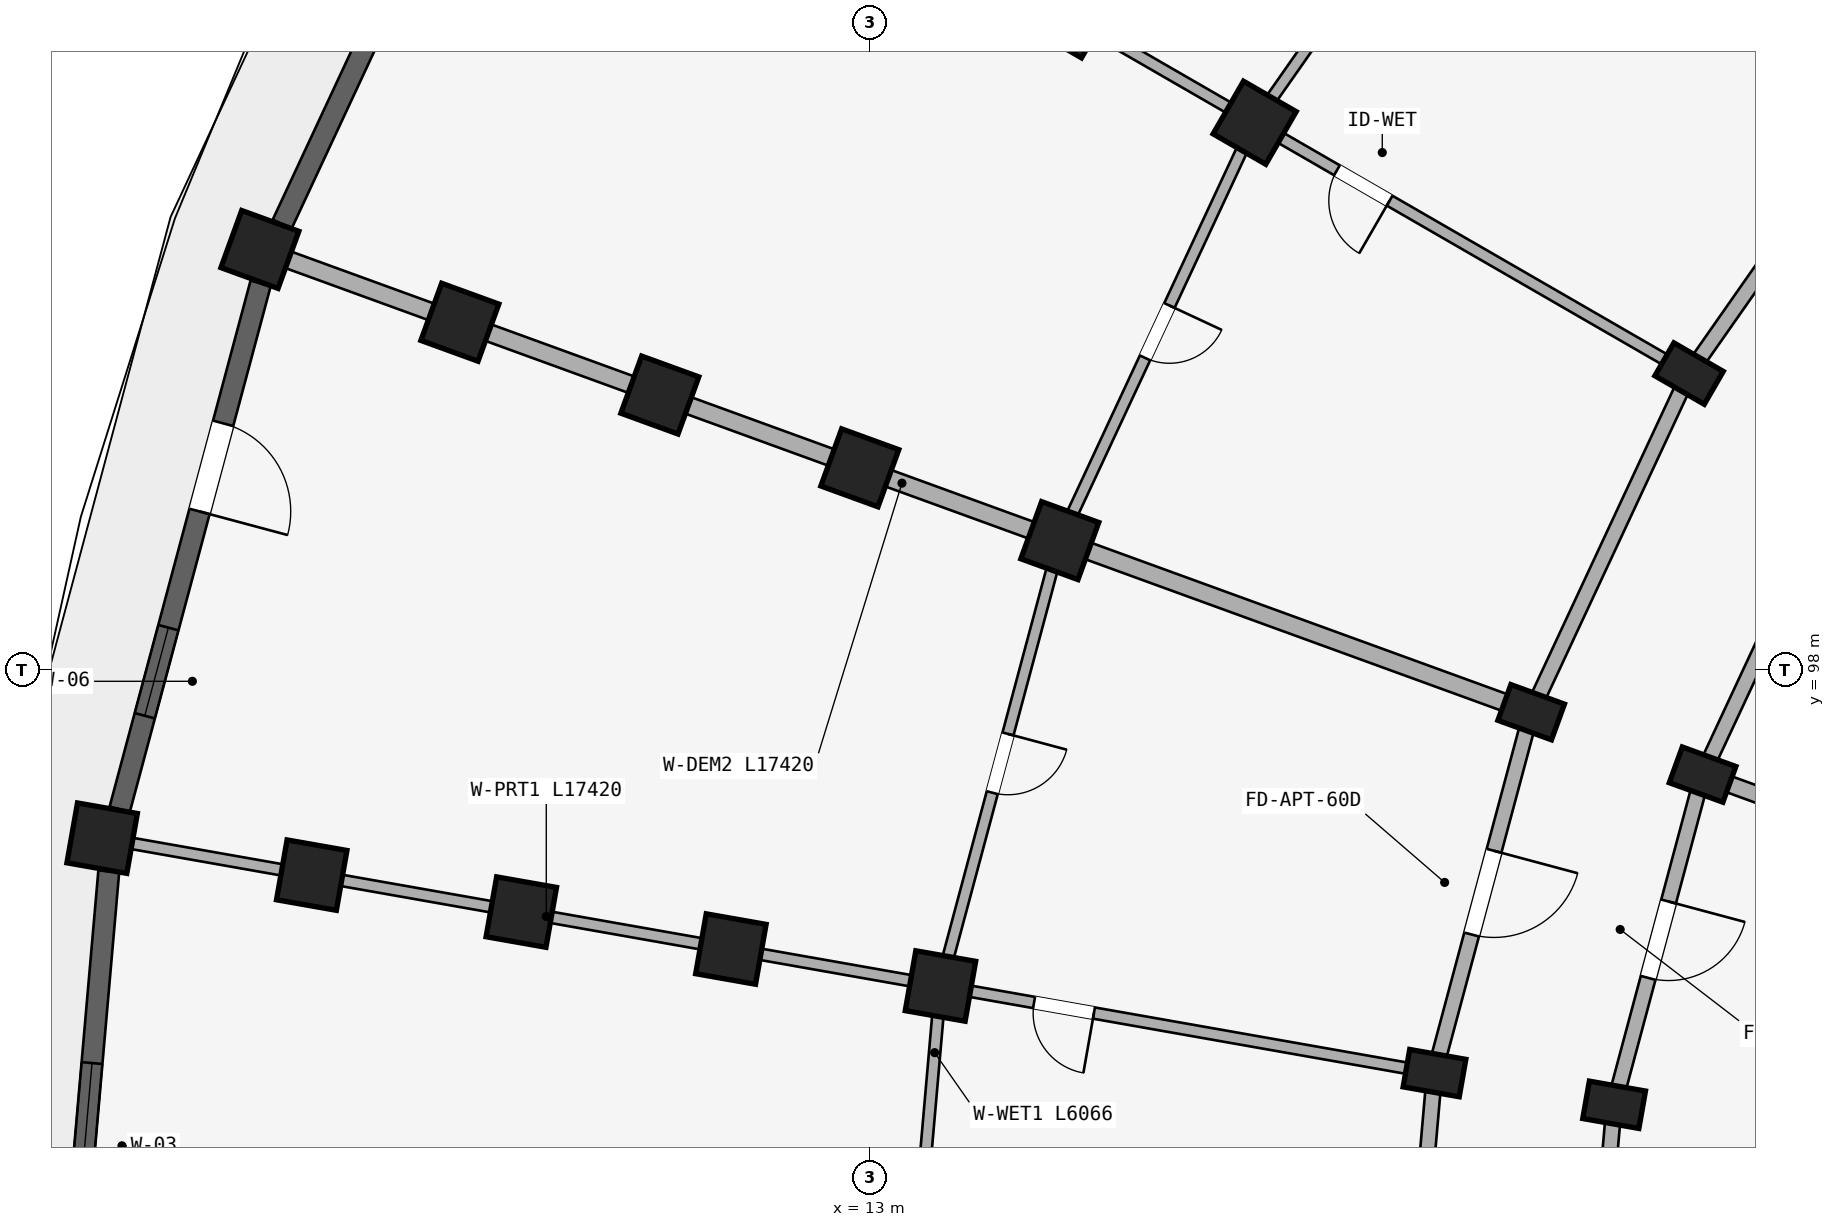
"""IFC4 building model, lengths in metres.
Left out: names, types, materials, properties, quantities, classifications, styles, units other than length and angle.
Written with IfcOpenShell. Run it as: python <this file> out.ifc"""

import sys

from ifc_helpers import new_model, si_unit, direction, frame, frame_2d, origin, origin_2d, place, context, subcontext, project, spatial, rectangle, extrude, element, fill, save


model = new_model("IFC4")
c1 = context("Model", 3, precision=1e-05, world=origin(), true_north=direction((0.0, 1.0)))
c2 = subcontext(c1, "Body", "Model", "MODEL_VIEW")
j1 = project(units=[si_unit("LENGTHUNIT", "METRE"), si_unit("PLANEANGLEUNIT", "RADIAN")], contexts=[c1])
p1 = place(None, origin())
s1 = spatial("IfcSite", under=j1, at=p1, CompositionType="ELEMENT")
p2 = place(p1, origin())
s2 = spatial("IfcBuilding", under=s1, at=p2, CompositionType="ELEMENT")
p3 = place(p2, frame((0.0, 0.0, 8.7)))
s3 = spatial("IfcBuildingStorey", under=s2, at=p3, CompositionType="ELEMENT", Elevation=8.7)
p4 = place(p3, frame((23.778, 101.9, 0.0), z_axis=(0.0, 0.0, 1.0), x_axis=(0.5, 0.866025403784, 0.0)))
e1 = element("IfcColumn", 1, at=p4, inside=s3, PredefinedType="COLUMN", context=c2, shape_type="SweptSolid", body=[
    extrude(rectangle(XDim=0.5, YDim=0.75, at=origin_2d()), origin(), (0.0, 0.0, 1.0), 2.93),
])
for number, where, z_axis, x_axis in (
    (2, (18.062, 105.2, 0.0), (0.0, 0.0, 1.0), (0.5, 0.866, 0.0)),
    (3, (15.637, 106.6, 0.0), (0.0, 0.0, 1.0), (0.5, 0.866, 0.0)),
):
    element("IfcColumn", number, at=place(p3, frame(where, z_axis=z_axis, x_axis=x_axis)), inside=s3, PredefinedType="COLUMN", context=c2, shape_type="SweptSolid", body=[
        extrude(rectangle(XDim=0.8, YDim=0.8, at=origin_2d()), origin(), (0.0, 0.0, 1.0), 2.93),
    ])
for number, where, z_axis, x_axis in (
    (4, (23.956, 96.624, 0.0), (0.0, 0.0, 1.0), (0.342, 0.94, 0.0)),
    (5, (21.701, 97.445, 0.0), (0.0, 0.0, 1.0), (0.342, 0.94, 0.0)),
):
    element("IfcColumn", number, at=place(p3, frame(where, z_axis=z_axis, x_axis=x_axis)), inside=s3, PredefinedType="COLUMN", context=c2, shape_type="SweptSolid", body=[
        extrude(rectangle(XDim=0.5, YDim=0.75, at=origin_2d()), origin(), (0.0, 0.0, 1.0), 2.93),
    ])
for number, where, z_axis, x_axis in (
    (6, (15.499, 99.702, 0.0), (0.0, 0.0, 1.0), (0.342, 0.94, 0.0)),
    (7, (12.868, 100.66, 0.0), (0.0, 0.0, 1.0), (0.342, 0.94, 0.0)),
    (8, (10.236, 101.618, 0.0), (0.0, 0.0, 1.0), (0.342, 0.94, 0.0)),
    (9, (7.605, 102.575, 0.0), (0.0, 0.0, 1.0), (0.342, 0.94, 0.0)),
    (10, (4.974, 103.533, 0.0), (0.0, 0.0, 1.0), (0.342, 0.94, 0.0)),
):
    element("IfcColumn", number, at=place(p3, frame(where, z_axis=z_axis, x_axis=x_axis)), inside=s3, PredefinedType="COLUMN", context=c2, shape_type="SweptSolid", body=[
        extrude(rectangle(XDim=0.8, YDim=0.8, at=origin_2d()), origin(), (0.0, 0.0, 1.0), 2.93),
    ])
for number, where, z_axis, x_axis in (
    (11, (22.792, 92.28, 0.0), (0.0, 0.0, 1.0), (0.174, 0.985, 0.0)),
    (12, (20.428, 92.697, 0.0), (0.0, 0.0, 1.0), (0.174, 0.985, 0.0)),
):
    element("IfcColumn", number, at=place(p3, frame(where, z_axis=z_axis, x_axis=x_axis)), inside=s3, PredefinedType="COLUMN", context=c2, shape_type="SweptSolid", body=[
        extrude(rectangle(XDim=0.5, YDim=0.75, at=origin_2d()), origin(), (0.0, 0.0, 1.0), 2.93),
    ])
for number, where, z_axis, x_axis in (
    (13, (13.929, 93.843, 0.0), (0.0, 0.0, 1.0), (0.174, 0.985, 0.0)),
    (14, (11.171, 94.329, 0.0), (0.0, 0.0, 1.0), (0.174, 0.985, 0.0)),
    (15, (8.414, 94.815, 0.0), (0.0, 0.0, 1.0), (0.174, 0.985, 0.0)),
    (16, (5.656, 95.302, 0.0), (0.0, 0.0, 1.0), (0.174, 0.985, 0.0)),
    (17, (2.899, 95.788, 0.0), (0.0, 0.0, 1.0), (0.174, 0.985, 0.0)),
):
    element("IfcColumn", number, at=place(p3, frame(where, z_axis=z_axis, x_axis=x_axis)), inside=s3, PredefinedType="COLUMN", context=c2, shape_type="SweptSolid", body=[
        extrude(rectangle(XDim=0.8, YDim=0.8, at=origin_2d()), origin(), (0.0, 0.0, 1.0), 2.93),
    ])
p5 = place(p3, frame((26.598, 105.927, 0.0), z_axis=(0.0, 0.0, 1.0), x_axis=(-0.573592335331, -0.819140911474, 0.0)))
e18 = element("IfcWall", 18, at=p5, inside=s3, PredefinedType="STANDARD", context=c2, shape_type="SweptSolid", body=[
    extrude(rectangle(XDim=4.916, YDim=0.2, at=frame_2d((2.458, 0.0))), origin(), (0.0, 0.0, 1.0), 2.372),
])
p6 = place(p5, frame((1.918, 0.0, 0.0)))
e19 = element("IfcOpeningElement", 19, at=p6, cuts=e18, PredefinedType="OPENING", context=c2, shape_type="SweptSolid", body=[
    extrude(rectangle(XDim=1.08, YDim=2.15, at=frame_2d((0.54, 1.075))), frame((0.0, 0.11, 0.0), z_axis=(0.0, -1.0, 0.0), x_axis=(1.0, 0.0, 0.0)), (0.0, 0.0, 1.0), 0.22),
])
p7 = place(p3, frame((25.856, 100.7, 0.0), z_axis=(0.0, 0.0, 1.0), x_axis=(-0.422617978463, -0.906307919131, 0.0)))
e20 = element("IfcWall", 20, at=p7, inside=s3, PredefinedType="STANDARD", context=c2, shape_type="SweptSolid", body=[
    extrude(rectangle(XDim=4.497, YDim=0.2, at=frame_2d((2.249, 0.0))), origin(), (0.0, 0.0, 1.0), 2.372),
])
p8 = place(p3, frame((23.778, 101.9, 0.0), z_axis=(0.0, 0.0, 1.0), x_axis=(-0.422629854778, -0.906302381024, 0.0)))
e21 = element("IfcWall", 21, at=p8, inside=s3, PredefinedType="STANDARD", context=c2, shape_type="SweptSolid", body=[
    extrude(rectangle(XDim=4.915, YDim=0.2, at=frame_2d((2.458, 0.0))), origin(), (0.0, 0.0, 1.0), 2.372),
])
p9 = place(p3, frame((23.956, 96.624, 0.0), z_axis=(0.0, 0.0, 1.0), x_axis=(-0.258787642463, -0.965934240054, 0.0)))
e22 = element("IfcWall", 22, at=p9, inside=s3, PredefinedType="STANDARD", context=c2, shape_type="SweptSolid", body=[
    extrude(rectangle(XDim=4.497, YDim=0.2, at=frame_2d((2.249, 0.0))), origin(), (0.0, 0.0, 1.0), 2.372),
])
p10 = place(p9, frame((1.729, 0.0, 0.0)))
e23 = element("IfcOpeningElement", 23, at=p10, cuts=e22, PredefinedType="OPENING", context=c2, shape_type="SweptSolid", body=[
    extrude(rectangle(XDim=1.04, YDim=2.15, at=frame_2d((0.52, 1.075))), frame((0.0, 0.11, 0.0), z_axis=(0.0, -1.0, 0.0), x_axis=(1.0, 0.0, 0.0)), (0.0, 0.0, 1.0), 0.22),
])
p11 = place(p3, frame((21.701, 97.445, 0.0), z_axis=(0.0, 0.0, 1.0), x_axis=(-0.258803112091, -0.965930095386, 0.0)))
e24 = element("IfcWall", 24, at=p11, inside=s3, PredefinedType="STANDARD", context=c2, shape_type="SweptSolid", body=[
    extrude(rectangle(XDim=4.916, YDim=0.2, at=frame_2d((2.458, 0.0))), origin(), (0.0, 0.0, 1.0), 2.372),
])
p12 = place(p11, frame((1.888, 0.0, 0.0)))
e25 = element("IfcOpeningElement", 25, at=p12, cuts=e24, PredefinedType="OPENING", context=c2, shape_type="SweptSolid", body=[
    extrude(rectangle(XDim=1.14, YDim=2.15, at=frame_2d((0.57, 1.075))), frame((0.0, 0.11, 0.0), z_axis=(0.0, -1.0, 0.0), x_axis=(1.0, 0.0, 0.0)), (0.0, 0.0, 1.0), 0.22),
])
p13 = place(p3, frame((22.792, 92.28, 0.0), z_axis=(0.0, 0.0, 1.0), x_axis=(-0.087187153726, -0.996191949488, 0.0)))
e26 = element("IfcWall", 26, at=p13, inside=s3, PredefinedType="STANDARD", context=c2, shape_type="SweptSolid", body=[
    extrude(rectangle(XDim=4.497, YDim=0.2, at=frame_2d((2.249, 0.0))), origin(), (0.0, 0.0, 1.0), 2.372),
])
p14 = place(p3, frame((20.428, 92.697, 0.0), z_axis=(0.0, 0.0, 1.0), x_axis=(-0.087167566415, -0.996193663584, 0.0)))
e27 = element("IfcWall", 27, at=p14, inside=s3, PredefinedType="STANDARD", context=c2, shape_type="SweptSolid", body=[
    extrude(rectangle(XDim=4.916, YDim=0.2, at=frame_2d((2.458, 0.0))), origin(), (0.0, 0.0, 1.0), 2.372),
])
p15 = place(p3, frame((26.521, 105.991, 0.0), z_axis=(0.0, 0.0, 1.0), x_axis=(-0.766046835987, 0.642784757967, 0.0)))
e28 = element("IfcWall", 28, at=p15, inside=s3, PredefinedType="STANDARD", context=c2, shape_type="SweptSolid", body=[
    extrude(rectangle(XDim=17.42, YDim=0.23, at=frame_2d((8.71, 0.0))), origin(), (0.0, 0.0, 1.0), 2.372),
])
p16 = place(p3, frame((23.691, 101.95, 0.0), z_axis=(0.0, 0.0, 1.0), x_axis=(-0.866026648973, 0.499997843263, 0.0)))
e29 = element("IfcWall", 29, at=p16, inside=s3, PredefinedType="PARTITIONING", context=c2, shape_type="SweptSolid", body=[
    extrude(rectangle(XDim=17.42, YDim=0.15, at=frame_2d((8.71, 0.0))), origin(), (0.0, 0.0, 1.0), 2.372),
])
p17 = place(p16, frame((4.45, 0.0, 0.0)))
e30 = element("IfcOpeningElement", 30, at=p17, cuts=e29, PredefinedType="OPENING", context=c2, shape_type="SweptSolid", body=[
    extrude(rectangle(XDim=0.8, YDim=2.1, at=frame_2d((0.4, 1.05))), frame((0.0, 0.085, 0.0), z_axis=(0.0, -1.0, 0.0), x_axis=(1.0, 0.0, 0.0)), (0.0, 0.0, 1.0), 0.17),
])
p18 = place(p3, frame((30.346, 94.298, 0.0), z_axis=(0.0, 0.0, 1.0), x_axis=(-0.939696231917, 0.342010221662, 0.0)))
e31 = element("IfcWall", 31, at=p18, inside=s3, PredefinedType="STANDARD", context=c2, shape_type="SweptSolid", body=[
    extrude(rectangle(XDim=6.75, YDim=0.22, at=frame_2d((3.375, 0.0))), origin(), (0.0, 0.0, 1.0), 2.372),
])
p19 = place(p3, frame((21.607, 97.479, 0.0), z_axis=(0.0, 0.0, 1.0), x_axis=(-0.939691901159, 0.342022120477, 0.0)))
e32 = element("IfcWall", 32, at=p19, inside=s3, PredefinedType="STANDARD", context=c2, shape_type="SweptSolid", body=[
    extrude(rectangle(XDim=17.42, YDim=0.23, at=frame_2d((8.71, 0.0))), origin(), (0.0, 0.0, 1.0), 2.372),
])
p20 = place(p3, frame((20.33, 92.714, 0.0), z_axis=(0.0, 0.0, 1.0), x_axis=(-0.984808098809, 0.173646216546, 0.0)))
e33 = element("IfcWall", 33, at=p20, inside=s3, PredefinedType="PARTITIONING", context=c2, shape_type="SweptSolid", body=[
    extrude(rectangle(XDim=17.42, YDim=0.15, at=frame_2d((8.71, 0.0))), origin(), (0.0, 0.0, 1.0), 2.372),
])
p21 = place(p20, frame((4.45, 0.0, 0.0)))
e34 = element("IfcOpeningElement", 34, at=p21, cuts=e33, PredefinedType="OPENING", context=c2, shape_type="SweptSolid", body=[
    extrude(rectangle(XDim=0.8, YDim=2.1, at=frame_2d((0.4, 1.05))), frame((0.0, 0.085, 0.0), z_axis=(0.0, -1.0, 0.0), x_axis=(1.0, 0.0, 0.0)), (0.0, 0.0, 1.0), 0.17),
])
p22 = place(p3, frame((21.542, 110.169, 0.0), z_axis=(0.0, 0.0, 1.0), x_axis=(-0.573594691504, -0.81913926159, 0.0)))
e35 = element("IfcWall", 35, at=p22, inside=s3, PredefinedType="PLUMBINGWALL", context=c2, shape_type="SweptSolid", body=[
    extrude(rectangle(XDim=6.066, YDim=0.15, at=frame_2d((3.033, 0.0))), origin(), (0.0, 0.0, 1.0), 2.372),
])
p23 = place(p22, frame((2.613, 0.0, 0.0)))
e36 = element("IfcOpeningElement", 36, at=p23, cuts=e35, PredefinedType="OPENING", context=c2, shape_type="SweptSolid", body=[
    extrude(rectangle(XDim=0.84, YDim=2.1, at=frame_2d((0.42, 1.05))), frame((0.0, 0.085, 0.0), z_axis=(0.0, -1.0, 0.0), x_axis=(1.0, 0.0, 0.0)), (0.0, 0.0, 1.0), 0.17),
])
p24 = place(p3, frame((18.062, 105.2, 0.0), z_axis=(0.0, 0.0, 1.0), x_axis=(-0.42260781991, -0.906312656069, 0.0)))
e37 = element("IfcWall", 37, at=p24, inside=s3, PredefinedType="PLUMBINGWALL", context=c2, shape_type="SweptSolid", body=[
    extrude(rectangle(XDim=6.066, YDim=0.15, at=frame_2d((3.033, 0.0))), origin(), (0.0, 0.0, 1.0), 2.372),
])
p25 = place(p24, frame((2.653, 0.0, 0.0)))
e38 = element("IfcOpeningElement", 38, at=p25, cuts=e37, PredefinedType="OPENING", context=c2, shape_type="SweptSolid", body=[
    extrude(rectangle(XDim=0.76, YDim=2.05, at=frame_2d((0.38, 1.025))), frame((0.0, 0.085, 0.0), z_axis=(0.0, -1.0, 0.0), x_axis=(1.0, 0.0, 0.0)), (0.0, 0.0, 1.0), 0.17),
])
p26 = place(p3, frame((15.499, 99.702, 0.0), z_axis=(0.0, 0.0, 1.0), x_axis=(-0.258827283048, -0.965923618901, 0.0)))
e39 = element("IfcWall", 39, at=p26, inside=s3, PredefinedType="PLUMBINGWALL", context=c2, shape_type="SweptSolid", body=[
    extrude(rectangle(XDim=6.066, YDim=0.15, at=frame_2d((3.033, 0.0))), origin(), (0.0, 0.0, 1.0), 2.372),
])
p27 = place(p26, frame((2.633, 0.0, 0.0)))
e40 = element("IfcOpeningElement", 40, at=p27, cuts=e39, PredefinedType="OPENING", context=c2, shape_type="SweptSolid", body=[
    extrude(rectangle(XDim=0.8, YDim=2.1, at=frame_2d((0.4, 1.05))), frame((0.0, 0.085, 0.0), z_axis=(0.0, -1.0, 0.0), x_axis=(1.0, 0.0, 0.0)), (0.0, 0.0, 1.0), 0.17),
])
p28 = place(p3, frame((13.929, 93.843, 0.0), z_axis=(0.0, 0.0, 1.0), x_axis=(-0.087174938512, -0.996193018494, 0.0)))
e41 = element("IfcWall", 41, at=p28, inside=s3, PredefinedType="PLUMBINGWALL", context=c2, shape_type="SweptSolid", body=[
    extrude(rectangle(XDim=6.066, YDim=0.15, at=frame_2d((3.033, 0.0))), origin(), (0.0, 0.0, 1.0), 2.372),
])
p29 = place(p28, frame((2.613, 0.0, 0.0)))
e42 = element("IfcOpeningElement", 42, at=p29, cuts=e41, PredefinedType="OPENING", context=c2, shape_type="SweptSolid", body=[
    extrude(rectangle(XDim=0.84, YDim=2.1, at=frame_2d((0.42, 1.05))), frame((0.0, 0.085, 0.0), z_axis=(0.0, -1.0, 0.0), x_axis=(1.0, 0.0, 0.0)), (0.0, 0.0, 1.0), 0.17),
])
p30 = place(p3, frame((8.296, 110.36, 0.0), z_axis=(0.0, 0.0, 1.0), x_axis=(-0.422633596215, -0.906300636296, 0.0)))
e43 = element("IfcWall", 43, at=p30, inside=s3, PredefinedType="STANDARD", context=c2, shape_type="SweptSolid", body=[
    extrude(rectangle(XDim=7.164, YDim=0.275, at=frame_2d((3.582, 0.0))), origin(), (0.0, 0.0, 1.0), 2.472),
])
p31 = place(p30, frame((2.757, 0.0, 0.522)))
e44 = element("IfcOpeningElement", 44, at=p31, cuts=e43, PredefinedType="OPENING", context=c2, shape_type="SweptSolid", body=[
    extrude(rectangle(XDim=1.65, YDim=1.75, at=frame_2d((0.825, 0.875))), frame((0.0, 0.147, 0.0), z_axis=(0.0, -1.0, 0.0), x_axis=(1.0, 0.0, 0.0)), (0.0, 0.0, 1.0), 0.295),
])
p32 = place(p3, frame((4.984, 103.088, 0.0), z_axis=(0.0, 0.0, 1.0), x_axis=(-0.258826933296, -0.965923712619, 0.0)))
e45 = element("IfcWall", 45, at=p32, inside=s3, PredefinedType="STANDARD", context=c2, shape_type="SweptSolid", body=[
    extrude(rectangle(XDim=7.164, YDim=0.275, at=frame_2d((3.582, 0.0))), origin(), (0.0, 0.0, 1.0), 2.472),
])
p33 = place(p32, frame((4.69, 0.0, 0.322)))
e46 = element("IfcOpeningElement", 46, at=p33, cuts=e45, PredefinedType="OPENING", context=c2, shape_type="SweptSolid", body=[
    extrude(rectangle(XDim=1.2, YDim=1.5, at=frame_2d((0.6, 0.75))), frame((0.0, 0.147, 0.0), z_axis=(0.0, -1.0, 0.0), x_axis=(1.0, 0.0, 0.0)), (0.0, 0.0, 1.0), 0.295),
])
p34 = place(p32, frame((1.907, 0.0, 0.0)))
e47 = element("IfcOpeningElement", 47, at=p34, cuts=e45, PredefinedType="OPENING", context=c2, shape_type="SweptSolid", body=[
    extrude(rectangle(XDim=1.2, YDim=2.15, at=frame_2d((0.6, 1.075))), frame((0.0, 0.147, 0.0), z_axis=(0.0, -1.0, 0.0), x_axis=(1.0, 0.0, 0.0)), (0.0, 0.0, 1.0), 0.295),
])
p35 = place(p3, frame((2.986, 95.351, 0.0), z_axis=(0.0, 0.0, 1.0), x_axis=(-0.08713989423, -0.99619608453, 0.0)))
e48 = element("IfcWall", 48, at=p35, inside=s3, PredefinedType="STANDARD", context=c2, shape_type="SweptSolid", body=[
    extrude(rectangle(XDim=7.164, YDim=0.275, at=frame_2d((3.582, 0.0))), origin(), (0.0, 0.0, 1.0), 2.472),
])
p36 = place(p35, frame((2.532, 0.0, 0.472)))
e49 = element("IfcOpeningElement", 49, at=p36, cuts=e48, PredefinedType="OPENING", context=c2, shape_type="SweptSolid", body=[
    extrude(rectangle(XDim=2.1, YDim=1.8, at=frame_2d((1.05, 0.9))), frame((0.0, 0.147, 0.0), z_axis=(0.0, -1.0, 0.0), x_axis=(1.0, 0.0, 0.0)), (0.0, 0.0, 1.0), 0.295),
])
p37 = place(p33, origin())
e50 = element("IfcWindow", 50, at=p37, inside=s3, PartitioningType="SINGLE_PANEL", PredefinedType="WINDOW", context=c2, shape_type="SweptSolid", body=[
    extrude(rectangle(XDim=1.2, YDim=1.5, at=frame_2d((0.6, 0.75))), frame((0.0, 0.03, 0.0), z_axis=(0.0, -1.0, 0.0), x_axis=(1.0, 0.0, 0.0)), (0.0, 0.0, 1.0), 0.06),
])
fill(e46, e50)
p38 = place(p36, origin())
e51 = element("IfcWindow", 51, at=p38, inside=s3, PartitioningType="TRIPLE_PANEL_VERTICAL", PredefinedType="WINDOW", context=c2, shape_type="SweptSolid", body=[
    extrude(rectangle(XDim=2.1, YDim=1.8, at=frame_2d((1.05, 0.9))), frame((0.0, 0.03, 0.0), z_axis=(0.0, -1.0, 0.0), x_axis=(1.0, 0.0, 0.0)), (0.0, 0.0, 1.0), 0.06),
])
fill(e49, e51)
p39 = place(p17, origin())
e52 = element("IfcDoor", 52, at=p39, inside=s3, OperationType="SINGLE_SWING_LEFT", PredefinedType="DOOR", context=c2, shape_type="SweptSolid", body=[
    extrude(rectangle(XDim=0.8, YDim=2.1, at=frame_2d((0.4, 1.05))), frame((0.0, 0.025, 0.0), z_axis=(0.0, -1.0, 0.0), x_axis=(1.0, 0.0, 0.0)), (0.0, 0.0, 1.0), 0.05),
])
fill(e30, e52)
p40 = place(p21, frame((0.8, 0.0, 0.0), z_axis=(0.0, 0.0, 1.0), x_axis=(-1.0, 0.0, 0.0)))
e53 = element("IfcDoor", 53, at=p40, inside=s3, OperationType="SINGLE_SWING_RIGHT", PredefinedType="DOOR", context=c2, shape_type="SweptSolid", body=[
    extrude(rectangle(XDim=0.8, YDim=2.1, at=frame_2d((0.4, 1.05))), frame((0.0, 0.025, 0.0), z_axis=(0.0, -1.0, 0.0), x_axis=(1.0, 0.0, 0.0)), (0.0, 0.0, 1.0), 0.05),
])
fill(e34, e53)
p41 = place(p25, frame((0.76, 0.0, 0.0), z_axis=(0.0, 0.0, 1.0), x_axis=(-1.0, 0.0, 0.0)))
e54 = element("IfcDoor", 54, at=p41, inside=s3, OperationType="SINGLE_SWING_RIGHT", PredefinedType="DOOR", context=c2, shape_type="SweptSolid", body=[
    extrude(rectangle(XDim=0.76, YDim=2.05, at=frame_2d((0.38, 1.025))), frame((0.0, 0.025, 0.0), z_axis=(0.0, -1.0, 0.0), x_axis=(1.0, 0.0, 0.0)), (0.0, 0.0, 1.0), 0.05),
])
fill(e38, e54)
p42 = place(p12, origin())
e55 = element("IfcDoor", 55, at=p42, inside=s3, OperationType="SINGLE_SWING_LEFT", PredefinedType="DOOR", context=c2, shape_type="SweptSolid", body=[
    extrude(rectangle(XDim=1.14, YDim=2.15, at=frame_2d((0.57, 1.075))), frame((0.0, 0.025, 0.0), z_axis=(0.0, -1.0, 0.0), x_axis=(1.0, 0.0, 0.0)), (0.0, 0.0, 1.0), 0.05),
])
fill(e25, e55)
p43 = place(p27, frame((0.8, 0.0, 0.0), z_axis=(0.0, 0.0, 1.0), x_axis=(-1.0, 0.0, 0.0)))
e56 = element("IfcDoor", 56, at=p43, inside=s3, OperationType="SINGLE_SWING_RIGHT", PredefinedType="DOOR", context=c2, shape_type="SweptSolid", body=[
    extrude(rectangle(XDim=0.8, YDim=2.1, at=frame_2d((0.4, 1.05))), frame((0.0, 0.025, 0.0), z_axis=(0.0, -1.0, 0.0), x_axis=(1.0, 0.0, 0.0)), (0.0, 0.0, 1.0), 0.05),
])
fill(e40, e56)
p44 = place(p10, origin())
e57 = element("IfcDoor", 57, at=p44, inside=s3, OperationType="SINGLE_SWING_LEFT", PredefinedType="DOOR", context=c2, shape_type="SweptSolid", body=[
    extrude(rectangle(XDim=1.04, YDim=2.15, at=frame_2d((0.52, 1.075))), frame((0.0, 0.025, 0.0), z_axis=(0.0, -1.0, 0.0), x_axis=(1.0, 0.0, 0.0)), (0.0, 0.0, 1.0), 0.05),
])
fill(e23, e57)
p45 = place(p34, frame((1.2, 0.0, 0.0), z_axis=(0.0, 0.0, 1.0), x_axis=(-1.0, 0.0, 0.0)))
e58 = element("IfcDoor", 58, at=p45, inside=s3, OperationType="SINGLE_SWING_LEFT", PredefinedType="DOOR", context=c2, shape_type="SweptSolid", body=[
    extrude(rectangle(XDim=1.2, YDim=2.15, at=frame_2d((0.6, 1.075))), frame((0.0, 0.025, 0.0), z_axis=(0.0, -1.0, 0.0), x_axis=(1.0, 0.0, 0.0)), (0.0, 0.0, 1.0), 0.05),
])
fill(e47, e58)
save(model, sys.argv[1])
